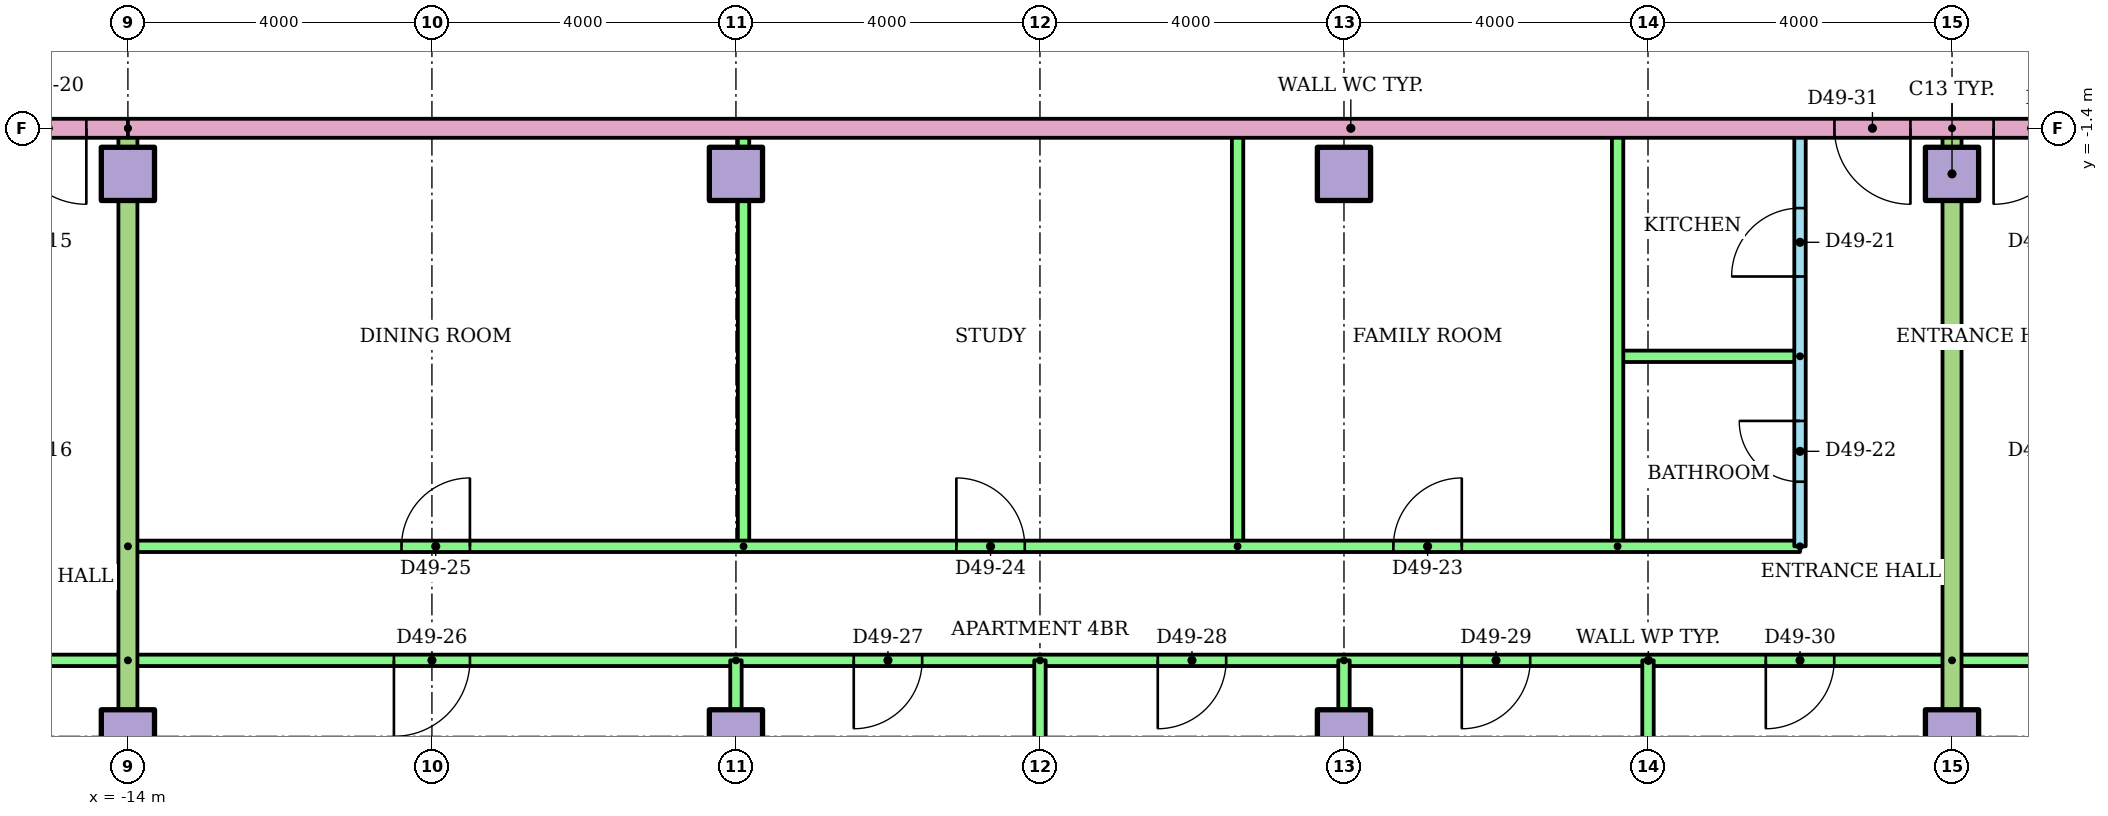
"""IFC4 building model, lengths in metres.
Left out: names, types, materials, properties, quantities, classifications, styles, units other than length and angle.
Written with IfcOpenShell. Run it as: python <this file> out.ifc"""

import sys

from ifc_helpers import new_model, si_unit, direction, frame, frame_2d, origin, origin_2d, place, context, subcontext, project, spatial, rectangle, extrude, element, fill, save


model = new_model("IFC4")
c1 = context("Model", 3, precision=1e-05, world=origin(), true_north=direction((0.0, 1.0)))
c2 = subcontext(c1, "Body", "Model", "MODEL_VIEW")
j1 = project(units=[si_unit("LENGTHUNIT", "METRE"), si_unit("PLANEANGLEUNIT", "RADIAN")], contexts=[c1])
p1 = place(None, origin())
s1 = spatial("IfcSite", under=j1, at=p1, CompositionType="ELEMENT")
p2 = place(p1, origin())
s2 = spatial("IfcBuilding", under=s1, at=p2, CompositionType="ELEMENT")
p3 = place(p2, frame((0.0, 0.0, 187.7)))
s3 = spatial("IfcBuildingStorey", under=s2, at=p3, CompositionType="ELEMENT", Elevation=187.7)
for number, where in (
    (1, (-14.0, -9.4, 0.0)),
    (2, (-6.0, -9.4, 0.0)),
    (3, (2.0, -9.4, 0.0)),
    (4, (10.0, -9.4, 0.0)),
    (5, (-14.0, -2.0, 0.0)),
    (6, (-6.0, -2.0, 0.0)),
    (7, (2.0, -2.0, 0.0)),
    (8, (10.0, -2.0, 0.0)),
):
    element("IfcColumn", number, at=place(p3, frame(where)), inside=s3, PredefinedType="COLUMN", context=c2, shape_type="SweptSolid", body=[
        extrude(rectangle(XDim=0.7, YDim=0.7, at=origin_2d()), origin(), (0.0, 0.0, 1.0), 3.2),
    ])
p4 = place(p3, frame((-14.0, -8.4, 0.0), z_axis=(0.0, 0.0, 1.0), x_axis=(-1.0, 0.0, 0.0)))
e9 = element("IfcWall", 9, at=p4, inside=s3, PredefinedType="PARTITIONING", context=c2, shape_type="SweptSolid", body=[
    extrude(rectangle(XDim=10.81, YDim=0.15, at=frame_2d((5.405, 0.0))), origin(), (0.0, 0.0, 1.0), 2.4),
])
p5 = place(p4, frame((8.547, 0.0, 0.0)))
e10 = element("IfcOpeningElement", 10, at=p5, cuts=e9, PredefinedType="OPENING", context=c2, shape_type="SweptSolid", body=[
    extrude(rectangle(XDim=1.0, YDim=2.1, at=frame_2d((0.5, 1.05))), frame((0.0, 0.085, 0.0), z_axis=(0.0, -1.0, 0.0), x_axis=(1.0, 0.0, 0.0)), (0.0, 0.0, 1.0), 0.17),
])
p6 = place(p4, frame((2.55, 0.0, 0.0)))
e11 = element("IfcOpeningElement", 11, at=p6, cuts=e9, PredefinedType="OPENING", context=c2, shape_type="SweptSolid", body=[
    extrude(rectangle(XDim=1.0, YDim=2.1, at=frame_2d((0.5, 1.05))), frame((0.0, 0.085, 0.0), z_axis=(0.0, -1.0, 0.0), x_axis=(1.0, 0.0, 0.0)), (0.0, 0.0, 1.0), 0.17),
])
p7 = place(p3, frame((8.0, -6.9, 0.0), z_axis=(0.0, 0.0, 1.0), x_axis=(0.0, 1.0, 0.0)))
e12 = element("IfcWall", 12, at=p7, inside=s3, PredefinedType="PARTITIONING", context=c2, shape_type="SweptSolid", body=[
    extrude(rectangle(XDim=5.5, YDim=0.15, at=frame_2d((2.75, 0.0))), origin(), (0.0, 0.0, 1.0), 2.4),
])
p8 = place(p7, frame((3.55, 0.0, 0.0)))
e13 = element("IfcOpeningElement", 13, at=p8, cuts=e12, PredefinedType="OPENING", context=c2, shape_type="SweptSolid", body=[
    extrude(rectangle(XDim=0.9, YDim=2.1, at=frame_2d((0.45, 1.05))), frame((0.0, 0.085, 0.0), z_axis=(0.0, -1.0, 0.0), x_axis=(1.0, 0.0, 0.0)), (0.0, 0.0, 1.0), 0.17),
])
p9 = place(p7, frame((0.85, 0.0, 0.0)))
e14 = element("IfcOpeningElement", 14, at=p9, cuts=e12, PredefinedType="OPENING", context=c2, shape_type="SweptSolid", body=[
    extrude(rectangle(XDim=0.8, YDim=2.1, at=frame_2d((0.4, 1.05))), frame((0.0, 0.085, 0.0), z_axis=(0.0, -1.0, 0.0), x_axis=(1.0, 0.0, 0.0)), (0.0, 0.0, 1.0), 0.17),
])
p10 = place(p3, frame((8.0, -4.4, 0.0), z_axis=(0.0, 0.0, 1.0), x_axis=(-1.0, 0.0, 0.0)))
e15 = element("IfcWall", 15, at=p10, inside=s3, PredefinedType="PARTITIONING", context=c2, shape_type="SweptSolid", body=[
    extrude(rectangle(XDim=2.4, YDim=0.15, at=frame_2d((1.2, 0.0))), origin(), (0.0, 0.0, 1.0), 2.4),
])
for number, where, z_axis, x_axis in (
    (16, (5.6, -6.9, 0.0), (0.0, 0.0, 1.0), (0.0, 1.0, 0.0)),
    (17, (0.6, -6.9, 0.0), (0.0, 0.0, 1.0), (0.0, 1.0, 0.0)),
    (18, (-5.9, -6.9, 0.0), (0.0, 0.0, 1.0), (0.0, 1.0, 0.0)),
):
    element("IfcWall", number, at=place(p3, frame(where, z_axis=z_axis, x_axis=x_axis)), inside=s3, PredefinedType="PARTITIONING", context=c2, shape_type="SweptSolid", body=[
        extrude(rectangle(XDim=5.5, YDim=0.15, at=frame_2d((2.75, 0.0))), origin(), (0.0, 0.0, 1.0), 2.4),
    ])
p11 = place(p3, frame((-14.0, -6.9, 0.0)))
e19 = element("IfcWall", 19, at=p11, inside=s3, PredefinedType="PARTITIONING", context=c2, shape_type="SweptSolid", body=[
    extrude(rectangle(XDim=22.0, YDim=0.15, at=frame_2d((11.0, 0.0))), origin(), (0.0, 0.0, 1.0), 2.4),
])
p12 = place(p11, frame((16.65, 0.0, 0.0)))
e20 = element("IfcOpeningElement", 20, at=p12, cuts=e19, PredefinedType="OPENING", context=c2, shape_type="SweptSolid", body=[
    extrude(rectangle(XDim=0.9, YDim=2.1, at=frame_2d((0.45, 1.05))), frame((0.0, 0.085, 0.0), z_axis=(0.0, -1.0, 0.0), x_axis=(1.0, 0.0, 0.0)), (0.0, 0.0, 1.0), 0.17),
])
p13 = place(p11, frame((10.9, 0.0, 0.0)))
e21 = element("IfcOpeningElement", 21, at=p13, cuts=e19, PredefinedType="OPENING", context=c2, shape_type="SweptSolid", body=[
    extrude(rectangle(XDim=0.9, YDim=2.1, at=frame_2d((0.45, 1.05))), frame((0.0, 0.085, 0.0), z_axis=(0.0, -1.0, 0.0), x_axis=(1.0, 0.0, 0.0)), (0.0, 0.0, 1.0), 0.17),
])
p14 = place(p11, frame((3.6, 0.0, 0.0)))
e22 = element("IfcOpeningElement", 22, at=p14, cuts=e19, PredefinedType="OPENING", context=c2, shape_type="SweptSolid", body=[
    extrude(rectangle(XDim=0.9, YDim=2.1, at=frame_2d((0.45, 1.05))), frame((0.0, 0.085, 0.0), z_axis=(0.0, -1.0, 0.0), x_axis=(1.0, 0.0, 0.0)), (0.0, 0.0, 1.0), 0.17),
])
p15 = place(p3, frame((10.0, -8.4, 0.0), z_axis=(0.0, 0.0, 1.0), x_axis=(-1.0, 0.0, 0.0)))
e23 = element("IfcWall", 23, at=p15, inside=s3, PredefinedType="PARTITIONING", context=c2, shape_type="SweptSolid", body=[
    extrude(rectangle(XDim=24.0, YDim=0.15, at=frame_2d((12.0, 0.0))), origin(), (0.0, 0.0, 1.0), 2.4),
])
p16 = place(p15, frame((19.5, 0.0, 0.0)))
e24 = element("IfcOpeningElement", 24, at=p16, cuts=e23, PredefinedType="OPENING", context=c2, shape_type="SweptSolid", body=[
    extrude(rectangle(XDim=1.0, YDim=2.1, at=frame_2d((0.5, 1.05))), frame((0.0, 0.085, 0.0), z_axis=(0.0, -1.0, 0.0), x_axis=(1.0, 0.0, 0.0)), (0.0, 0.0, 1.0), 0.17),
])
p17 = place(p15, frame((13.55, 0.0, 0.0)))
e25 = element("IfcOpeningElement", 25, at=p17, cuts=e23, PredefinedType="OPENING", context=c2, shape_type="SweptSolid", body=[
    extrude(rectangle(XDim=0.9, YDim=2.1, at=frame_2d((0.45, 1.05))), frame((0.0, 0.085, 0.0), z_axis=(0.0, -1.0, 0.0), x_axis=(1.0, 0.0, 0.0)), (0.0, 0.0, 1.0), 0.17),
])
p18 = place(p15, frame((9.55, 0.0, 0.0)))
e26 = element("IfcOpeningElement", 26, at=p18, cuts=e23, PredefinedType="OPENING", context=c2, shape_type="SweptSolid", body=[
    extrude(rectangle(XDim=0.9, YDim=2.1, at=frame_2d((0.45, 1.05))), frame((0.0, 0.085, 0.0), z_axis=(0.0, -1.0, 0.0), x_axis=(1.0, 0.0, 0.0)), (0.0, 0.0, 1.0), 0.17),
])
p19 = place(p15, frame((5.55, 0.0, 0.0)))
e27 = element("IfcOpeningElement", 27, at=p19, cuts=e23, PredefinedType="OPENING", context=c2, shape_type="SweptSolid", body=[
    extrude(rectangle(XDim=0.9, YDim=2.1, at=frame_2d((0.45, 1.05))), frame((0.0, 0.085, 0.0), z_axis=(0.0, -1.0, 0.0), x_axis=(1.0, 0.0, 0.0)), (0.0, 0.0, 1.0), 0.17),
])
p20 = place(p15, frame((1.55, 0.0, 0.0)))
e28 = element("IfcOpeningElement", 28, at=p20, cuts=e23, PredefinedType="OPENING", context=c2, shape_type="SweptSolid", body=[
    extrude(rectangle(XDim=0.9, YDim=2.1, at=frame_2d((0.45, 1.05))), frame((0.0, 0.085, 0.0), z_axis=(0.0, -1.0, 0.0), x_axis=(1.0, 0.0, 0.0)), (0.0, 0.0, 1.0), 0.17),
])
p21 = place(p3, frame((-6.0, -8.4, 0.0), z_axis=(0.0, 0.0, 1.0), x_axis=(0.0, -1.0, 0.0)))
e29 = element("IfcWall", 29, at=p21, inside=s3, PredefinedType="PARTITIONING", context=c2, shape_type="SweptSolid", body=[
    extrude(rectangle(XDim=8.01, YDim=0.15, at=frame_2d((4.005, 0.0))), origin(), (0.0, 0.0, 1.0), 2.4),
])
p22 = place(p3, frame((-2.0, -8.4, 0.0), z_axis=(0.0, 0.0, 1.0), x_axis=(0.0, -1.0, 0.0)))
e30 = element("IfcWall", 30, at=p22, inside=s3, PredefinedType="PARTITIONING", context=c2, shape_type="SweptSolid", body=[
    extrude(rectangle(XDim=8.021, YDim=0.15, at=frame_2d((4.01, 0.0))), origin(), (0.0, 0.0, 1.0), 2.4),
])
p23 = place(p3, frame((2.0, -8.4, 0.0), z_axis=(0.0, 0.0, 1.0), x_axis=(0.0, -1.0, 0.0)))
e31 = element("IfcWall", 31, at=p23, inside=s3, PredefinedType="PARTITIONING", context=c2, shape_type="SweptSolid", body=[
    extrude(rectangle(XDim=8.01, YDim=0.15, at=frame_2d((4.005, 0.0))), origin(), (0.0, 0.0, 1.0), 2.4),
])
p24 = place(p3, frame((6.0, -8.4, 0.0), z_axis=(0.0, 0.0, 1.0), x_axis=(0.0, -1.0, 0.0)))
e32 = element("IfcWall", 32, at=p24, inside=s3, PredefinedType="PARTITIONING", context=c2, shape_type="SweptSolid", body=[
    extrude(rectangle(XDim=8.021, YDim=0.15, at=frame_2d((4.01, 0.0))), origin(), (0.0, 0.0, 1.0), 2.4),
])
p25 = place(p3, frame((-14.0, -1.4, 0.0), z_axis=(0.0, 0.0, 1.0), x_axis=(0.0, -1.0, 0.0)))
e33 = element("IfcWall", 33, at=p25, inside=s3, PredefinedType="PARTITIONING", context=c2, shape_type="SweptSolid", body=[
    extrude(rectangle(XDim=15.01, YDim=0.25, at=frame_2d((7.505, 0.0))), origin(), (0.0, 0.0, 1.0), 2.4),
])
p26 = place(p3, frame((18.0, -8.4, 0.0), z_axis=(0.0, 0.0, 1.0), x_axis=(-1.0, 0.0, 0.0)))
e34 = element("IfcWall", 34, at=p26, inside=s3, PredefinedType="PARTITIONING", context=c2, shape_type="SweptSolid", body=[
    extrude(rectangle(XDim=8.0, YDim=0.15, at=frame_2d((4.0, 0.0))), origin(), (0.0, 0.0, 1.0), 2.4),
])
p27 = place(p26, frame((5.5, 0.0, 0.0)))
e35 = element("IfcOpeningElement", 35, at=p27, cuts=e34, PredefinedType="OPENING", context=c2, shape_type="SweptSolid", body=[
    extrude(rectangle(XDim=1.0, YDim=2.1, at=frame_2d((0.5, 1.05))), frame((0.0, 0.085, 0.0), z_axis=(0.0, -1.0, 0.0), x_axis=(1.0, 0.0, 0.0)), (0.0, 0.0, 1.0), 0.17),
])
p28 = place(p26, frame((1.5, 0.0, 0.0)))
e36 = element("IfcOpeningElement", 36, at=p28, cuts=e34, PredefinedType="OPENING", context=c2, shape_type="SweptSolid", body=[
    extrude(rectangle(XDim=1.0, YDim=2.1, at=frame_2d((0.5, 1.05))), frame((0.0, 0.085, 0.0), z_axis=(0.0, -1.0, 0.0), x_axis=(1.0, 0.0, 0.0)), (0.0, 0.0, 1.0), 0.17),
])
p29 = place(p3, frame((10.0, -1.4, 0.0), z_axis=(0.0, 0.0, 1.0), x_axis=(0.0, -1.0, 0.0)))
e37 = element("IfcWall", 37, at=p29, inside=s3, PredefinedType="PARTITIONING", context=c2, shape_type="SweptSolid", body=[
    extrude(rectangle(XDim=15.01, YDim=0.25, at=frame_2d((7.505, 0.0))), origin(), (0.0, 0.0, 1.0), 2.4),
])
p30 = place(p3, frame((-14.0, -1.4, 0.0), z_axis=(0.0, 0.0, 1.0), x_axis=(-1.0, 0.0, 0.0)))
e38 = element("IfcWall", 38, at=p30, inside=s3, PredefinedType="PARTITIONING", context=c2, shape_type="SweptSolid", body=[
    extrude(rectangle(XDim=10.82, YDim=0.25, at=frame_2d((5.41, 0.0))), origin(), (0.0, 0.0, 1.0), 2.4),
])
p31 = place(p30, frame((0.547, 0.0, 0.0)))
e39 = element("IfcOpeningElement", 39, at=p31, cuts=e38, PredefinedType="OPENING", context=c2, shape_type="SweptSolid", body=[
    extrude(rectangle(XDim=1.0, YDim=2.1, at=frame_2d((0.5, 1.05))), frame((0.0, 0.135, 0.0), z_axis=(0.0, -1.0, 0.0), x_axis=(1.0, 0.0, 0.0)), (0.0, 0.0, 1.0), 0.27),
])
p32 = place(p3, frame((14.0, -1.4, 0.0), z_axis=(0.0, 0.0, 1.0), x_axis=(-1.0, 0.0, 0.0)))
e40 = element("IfcWall", 40, at=p32, inside=s3, PredefinedType="PARTITIONING", context=c2, shape_type="SweptSolid", body=[
    extrude(rectangle(XDim=28.0, YDim=0.25, at=frame_2d((14.0, 0.0))), origin(), (0.0, 0.0, 1.0), 2.4),
])
p33 = place(p32, frame((4.547, 0.0, 0.0)))
e41 = element("IfcOpeningElement", 41, at=p33, cuts=e40, PredefinedType="OPENING", context=c2, shape_type="SweptSolid", body=[
    extrude(rectangle(XDim=1.0, YDim=2.1, at=frame_2d((0.5, 1.05))), frame((0.0, 0.135, 0.0), z_axis=(0.0, -1.0, 0.0), x_axis=(1.0, 0.0, 0.0)), (0.0, 0.0, 1.0), 0.27),
])
p34 = place(p32, frame((2.453, 0.0, 0.0)))
e42 = element("IfcOpeningElement", 42, at=p34, cuts=e40, PredefinedType="OPENING", context=c2, shape_type="SweptSolid", body=[
    extrude(rectangle(XDim=1.0, YDim=2.1, at=frame_2d((0.5, 1.05))), frame((0.0, 0.135, 0.0), z_axis=(0.0, -1.0, 0.0), x_axis=(1.0, 0.0, 0.0)), (0.0, 0.0, 1.0), 0.27),
])
p35 = place(p31, origin())
e43 = element("IfcDoor", 43, at=p35, inside=s3, OperationType="SINGLE_SWING_LEFT", PredefinedType="DOOR", context=c2, shape_type="SweptSolid", body=[
    extrude(rectangle(XDim=1.0, YDim=2.1, at=frame_2d((0.5, 1.05))), frame((0.0, 0.025, 0.0), z_axis=(0.0, -1.0, 0.0), x_axis=(1.0, 0.0, 0.0)), (0.0, 0.0, 1.0), 0.05),
])
fill(e39, e43)
p36 = place(p8, origin())
e44 = element("IfcDoor", 44, at=p36, inside=s3, OperationType="SINGLE_SWING_LEFT", PredefinedType="DOOR", context=c2, shape_type="SweptSolid", body=[
    extrude(rectangle(XDim=0.9, YDim=2.1, at=frame_2d((0.45, 1.05))), frame((0.0, 0.025, 0.0), z_axis=(0.0, -1.0, 0.0), x_axis=(1.0, 0.0, 0.0)), (0.0, 0.0, 1.0), 0.05),
])
fill(e13, e44)
p37 = place(p9, origin())
e45 = element("IfcDoor", 45, at=p37, inside=s3, OperationType="SINGLE_SWING_RIGHT", PredefinedType="DOOR", context=c2, shape_type="SweptSolid", body=[
    extrude(rectangle(XDim=0.8, YDim=2.1, at=frame_2d((0.4, 1.05))), frame((0.0, 0.025, 0.0), z_axis=(0.0, -1.0, 0.0), x_axis=(1.0, 0.0, 0.0)), (0.0, 0.0, 1.0), 0.05),
])
fill(e14, e45)
p38 = place(p12, origin())
e46 = element("IfcDoor", 46, at=p38, inside=s3, OperationType="SINGLE_SWING_RIGHT", PredefinedType="DOOR", context=c2, shape_type="SweptSolid", body=[
    extrude(rectangle(XDim=0.9, YDim=2.1, at=frame_2d((0.45, 1.05))), frame((0.0, 0.025, 0.0), z_axis=(0.0, -1.0, 0.0), x_axis=(1.0, 0.0, 0.0)), (0.0, 0.0, 1.0), 0.05),
])
fill(e20, e46)
p39 = place(p13, origin())
e47 = element("IfcDoor", 47, at=p39, inside=s3, OperationType="SINGLE_SWING_LEFT", PredefinedType="DOOR", context=c2, shape_type="SweptSolid", body=[
    extrude(rectangle(XDim=0.9, YDim=2.1, at=frame_2d((0.45, 1.05))), frame((0.0, 0.025, 0.0), z_axis=(0.0, -1.0, 0.0), x_axis=(1.0, 0.0, 0.0)), (0.0, 0.0, 1.0), 0.05),
])
fill(e21, e47)
p40 = place(p14, origin())
e48 = element("IfcDoor", 48, at=p40, inside=s3, OperationType="SINGLE_SWING_RIGHT", PredefinedType="DOOR", context=c2, shape_type="SweptSolid", body=[
    extrude(rectangle(XDim=0.9, YDim=2.1, at=frame_2d((0.45, 1.05))), frame((0.0, 0.025, 0.0), z_axis=(0.0, -1.0, 0.0), x_axis=(1.0, 0.0, 0.0)), (0.0, 0.0, 1.0), 0.05),
])
fill(e22, e48)
p41 = place(p16, origin())
e49 = element("IfcDoor", 49, at=p41, inside=s3, OperationType="SINGLE_SWING_RIGHT", PredefinedType="DOOR", context=c2, shape_type="SweptSolid", body=[
    extrude(rectangle(XDim=1.0, YDim=2.1, at=frame_2d((0.5, 1.05))), frame((0.0, 0.025, 0.0), z_axis=(0.0, -1.0, 0.0), x_axis=(1.0, 0.0, 0.0)), (0.0, 0.0, 1.0), 0.05),
])
fill(e24, e49)
p42 = place(p17, origin())
e50 = element("IfcDoor", 50, at=p42, inside=s3, OperationType="SINGLE_SWING_RIGHT", PredefinedType="DOOR", context=c2, shape_type="SweptSolid", body=[
    extrude(rectangle(XDim=0.9, YDim=2.1, at=frame_2d((0.45, 1.05))), frame((0.0, 0.025, 0.0), z_axis=(0.0, -1.0, 0.0), x_axis=(1.0, 0.0, 0.0)), (0.0, 0.0, 1.0), 0.05),
])
fill(e25, e50)
p43 = place(p18, origin())
e51 = element("IfcDoor", 51, at=p43, inside=s3, OperationType="SINGLE_SWING_RIGHT", PredefinedType="DOOR", context=c2, shape_type="SweptSolid", body=[
    extrude(rectangle(XDim=0.9, YDim=2.1, at=frame_2d((0.45, 1.05))), frame((0.0, 0.025, 0.0), z_axis=(0.0, -1.0, 0.0), x_axis=(1.0, 0.0, 0.0)), (0.0, 0.0, 1.0), 0.05),
])
fill(e26, e51)
p44 = place(p19, origin())
e52 = element("IfcDoor", 52, at=p44, inside=s3, OperationType="SINGLE_SWING_RIGHT", PredefinedType="DOOR", context=c2, shape_type="SweptSolid", body=[
    extrude(rectangle(XDim=0.9, YDim=2.1, at=frame_2d((0.45, 1.05))), frame((0.0, 0.025, 0.0), z_axis=(0.0, -1.0, 0.0), x_axis=(1.0, 0.0, 0.0)), (0.0, 0.0, 1.0), 0.05),
])
fill(e27, e52)
p45 = place(p20, origin())
e53 = element("IfcDoor", 53, at=p45, inside=s3, OperationType="SINGLE_SWING_RIGHT", PredefinedType="DOOR", context=c2, shape_type="SweptSolid", body=[
    extrude(rectangle(XDim=0.9, YDim=2.1, at=frame_2d((0.45, 1.05))), frame((0.0, 0.025, 0.0), z_axis=(0.0, -1.0, 0.0), x_axis=(1.0, 0.0, 0.0)), (0.0, 0.0, 1.0), 0.05),
])
fill(e28, e53)
p46 = place(p33, origin())
e54 = element("IfcDoor", 54, at=p46, inside=s3, OperationType="SINGLE_SWING_LEFT", PredefinedType="DOOR", context=c2, shape_type="SweptSolid", body=[
    extrude(rectangle(XDim=1.0, YDim=2.1, at=frame_2d((0.5, 1.05))), frame((0.0, 0.025, 0.0), z_axis=(0.0, -1.0, 0.0), x_axis=(1.0, 0.0, 0.0)), (0.0, 0.0, 1.0), 0.05),
])
fill(e41, e54)
p47 = place(p34, origin())
e55 = element("IfcDoor", 55, at=p47, inside=s3, OperationType="SINGLE_SWING_RIGHT", PredefinedType="DOOR", context=c2, shape_type="SweptSolid", body=[
    extrude(rectangle(XDim=1.0, YDim=2.1, at=frame_2d((0.5, 1.05))), frame((0.0, 0.025, 0.0), z_axis=(0.0, -1.0, 0.0), x_axis=(1.0, 0.0, 0.0)), (0.0, 0.0, 1.0), 0.05),
])
fill(e42, e55)
save(model, sys.argv[1])
